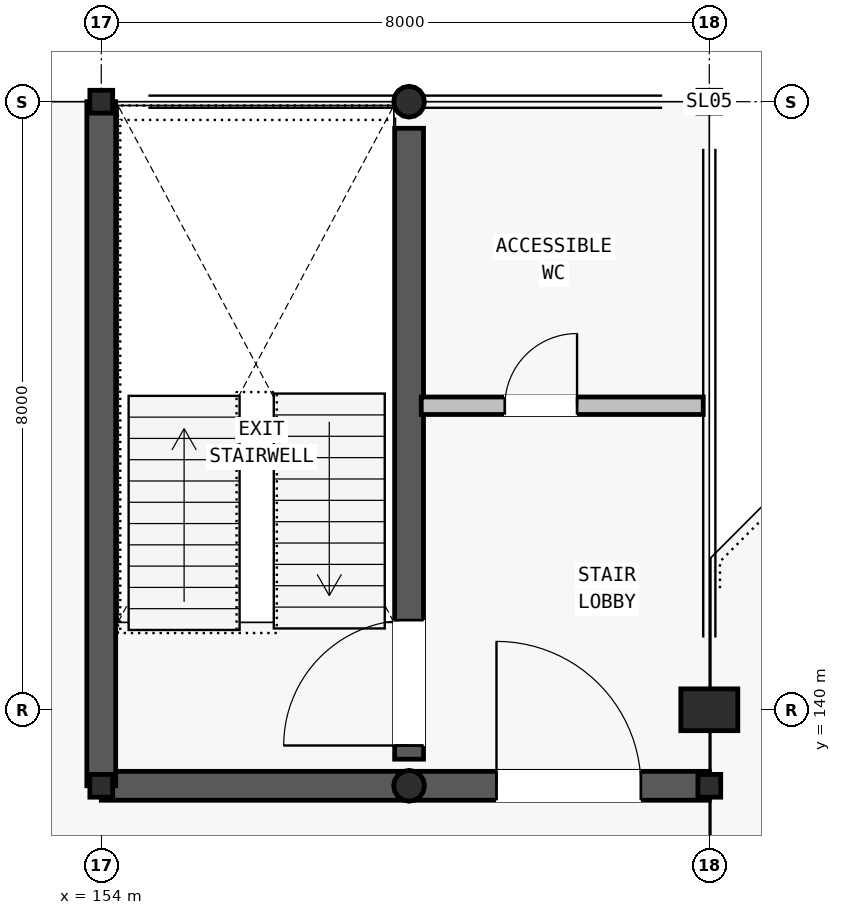
"""IFC4 building model, lengths in metres.
Left out: names, types, materials, properties, quantities, classifications, styles, units other than length and angle.
Written with IfcOpenShell. Run it as: python <this file> out.ifc"""

import sys

from ifc_helpers import new_model, si_unit, direction, frame, frame_2d, origin, origin_2d, place, context, subcontext, project, spatial, rectangle, hollow_circle, i_section, extrude, element, fill, save


model = new_model("IFC4")
c1 = context("Model", 3, precision=1e-05, world=origin(), true_north=direction((0.0, 1.0)))
c2 = subcontext(c1, "Body", "Model", "MODEL_VIEW")
j1 = project(units=[si_unit("LENGTHUNIT", "METRE"), si_unit("PLANEANGLEUNIT", "RADIAN")], contexts=[c1])
p1 = place(None, origin())
s1 = spatial("IfcSite", under=j1, at=p1, CompositionType="ELEMENT")
p2 = place(p1, origin())
s2 = spatial("IfcBuilding", under=s1, at=p2, CompositionType="ELEMENT")
p3 = place(p2, frame((0.0, 0.0, 5.6)))
s3 = spatial("IfcBuildingStorey", under=s2, at=p3, CompositionType="ELEMENT", Elevation=5.6)
for number, where, z_axis, x_axis in (
    (1, (154.0, 148.0, 0.0), (0.0, 0.0, 1.0), (1.0, 0.0, 0.0)),
    (2, (162.0, 148.0, 0.0), (0.0, 0.0, 1.0), (1.0, 0.0, 0.0)),
    (3, (154.0, 139.0, 0.0), (0.0, 0.0, 1.0), (1.0, 0.0, 0.0)),
    (4, (162.0, 139.0, 0.0), (0.0, 0.0, 1.0), (1.0, 0.0, 0.0)),
):
    element("IfcColumn", number, at=place(p3, frame(where, z_axis=z_axis, x_axis=x_axis)), inside=s3, PredefinedType="COLUMN", context=c2, shape_type="SweptSolid", body=[
        extrude(i_section(OverallWidth=0.3, OverallDepth=0.3, WebThickness=0.01, FlangeThickness=0.015, FilletRadius=0.018, at=origin_2d()), origin(), (0.0, 0.0, 1.0), 3.9),
    ])
for number, where, z_axis, x_axis in (
    (5, (158.05, 139.0, 0.0), (0.0, 0.0, 1.0), (1.0, 0.0, 0.0)),
    (6, (158.05, 148.0, 0.0), (0.0, 0.0, 1.0), (1.0, 0.0, 0.0)),
):
    element("IfcColumn", number, at=place(p3, frame(where, z_axis=z_axis, x_axis=x_axis)), inside=s3, PredefinedType="COLUMN", context=c2, shape_type="SweptSolid", body=[
        extrude(hollow_circle(Radius=0.203, WallThickness=0.014, at=origin_2d()), origin(), (0.0, 0.0, 1.0), 3.9),
    ])
p4 = place(p3, frame((162.0, 140.0, 0.0), z_axis=(0.0, 0.0, 1.0), x_axis=(1.0, 0.0, 0.0)))
e7 = element("IfcColumn", 7, at=p4, inside=s3, PredefinedType="COLUMN", context=c2, shape_type="SweptSolid", body=[
    extrude(rectangle(XDim=0.75, YDim=0.55, at=origin_2d()), origin(), (0.0, 0.0, 1.0), 3.9),
])
p5 = place(p3, frame((154.0, 139.0, 0.0), z_axis=(0.0, 0.0, 1.0), x_axis=(1.0, 0.0, 0.0)))
e8 = element("IfcWall", 8, at=p5, inside=s3, PredefinedType="SHEAR", context=c2, shape_type="SweptSolid", body=[
    extrude(rectangle(XDim=8.0, YDim=0.38, at=frame_2d((4.0, 0.0))), origin(), (0.0, 0.0, 1.0), 3.62),
])
p6 = place(p5, frame((5.2, 0.0, 0.0)))
e9 = element("IfcOpeningElement", 9, at=p6, cuts=e8, PredefinedType="OPENING", context=c2, shape_type="SweptSolid", body=[
    extrude(rectangle(XDim=1.9, YDim=2.3, at=frame_2d((0.95, 1.15))), frame((0.0, 0.2, 0.0), z_axis=(0.0, -1.0, 0.0), x_axis=(1.0, 0.0, 0.0)), (0.0, 0.0, 1.0), 0.4),
])
p7 = place(p3, frame((154.0, 148.0, 0.0), z_axis=(0.0, 0.0, 1.0), x_axis=(0.0, -1.0, 0.0)))
e10 = element("IfcWall", 10, at=p7, inside=s3, PredefinedType="SHEAR", context=c2, shape_type="SweptSolid", body=[
    extrude(rectangle(XDim=9.0, YDim=0.38, at=frame_2d((4.5, 0.0))), origin(), (0.0, 0.0, 1.0), 3.62),
])
p8 = place(p3, frame((158.05, 139.35, 0.0), z_axis=(0.0, 0.0, 1.0), x_axis=(0.0, 1.0, 0.0)))
e11 = element("IfcWall", 11, at=p8, inside=s3, PredefinedType="SHEAR", context=c2, shape_type="SweptSolid", body=[
    extrude(rectangle(XDim=8.3, YDim=0.38, at=frame_2d((4.15, 0.0))), origin(), (0.0, 0.0, 1.0), 3.62),
])
p9 = place(p8, frame((0.18, 0.0, 0.0)))
e12 = element("IfcOpeningElement", 12, at=p9, cuts=e11, PredefinedType="OPENING", context=c2, shape_type="SweptSolid", body=[
    extrude(rectangle(XDim=1.65, YDim=2.2, at=frame_2d((0.825, 1.1))), frame((0.0, 0.2, 0.0), z_axis=(0.0, -1.0, 0.0), x_axis=(1.0, 0.0, 0.0)), (0.0, 0.0, 1.0), 0.4),
])
p10 = place(p3, frame((158.21, 144.0, 0.0), z_axis=(0.0, 0.0, 1.0), x_axis=(1.0, 0.0, 0.0)))
e13 = element("IfcWall", 13, at=p10, inside=s3, PredefinedType="PARTITIONING", context=c2, shape_type="SweptSolid", body=[
    extrude(rectangle(XDim=3.71, YDim=0.23, at=frame_2d((1.855, 0.0))), origin(), (0.0, 0.0, 1.0), 2.48),
])
p11 = place(p10, frame((1.1, 0.0, 0.0)))
e14 = element("IfcOpeningElement", 14, at=p11, cuts=e13, PredefinedType="OPENING", context=c2, shape_type="SweptSolid", body=[
    extrude(rectangle(XDim=0.95, YDim=2.1, at=frame_2d((0.475, 1.05))), frame((0.0, 0.125, 0.0), z_axis=(0.0, -1.0, 0.0), x_axis=(1.0, 0.0, 0.0)), (0.0, 0.0, 1.0), 0.25),
])
p12 = place(p6, origin())
e15 = element("IfcDoor", 15, at=p12, inside=s3, OperationType="SINGLE_SWING_LEFT", PredefinedType="DOOR", context=c2, shape_type="SweptSolid", body=[
    extrude(rectangle(XDim=1.9, YDim=2.3, at=frame_2d((0.95, 1.15))), frame((0.0, 0.025, 0.0), z_axis=(0.0, -1.0, 0.0), x_axis=(1.0, 0.0, 0.0)), (0.0, 0.0, 1.0), 0.05),
])
fill(e9, e15)
p13 = place(p9, origin())
e16 = element("IfcDoor", 16, at=p13, inside=s3, OperationType="SINGLE_SWING_LEFT", PredefinedType="DOOR", context=c2, shape_type="SweptSolid", body=[
    extrude(rectangle(XDim=1.65, YDim=2.2, at=frame_2d((0.825, 1.1))), frame((0.0, 0.025, 0.0), z_axis=(0.0, -1.0, 0.0), x_axis=(1.0, 0.0, 0.0)), (0.0, 0.0, 1.0), 0.05),
])
fill(e12, e16)
p14 = place(p11, origin())
e17 = element("IfcDoor", 17, at=p14, inside=s3, OperationType="SINGLE_SWING_RIGHT", PredefinedType="DOOR", context=c2, shape_type="SweptSolid", body=[
    extrude(rectangle(XDim=0.95, YDim=2.1, at=frame_2d((0.475, 1.05))), frame((0.0, 0.025, 0.0), z_axis=(0.0, -1.0, 0.0), x_axis=(1.0, 0.0, 0.0)), (0.0, 0.0, 1.0), 0.05),
])
fill(e14, e17)
save(model, sys.argv[1])
